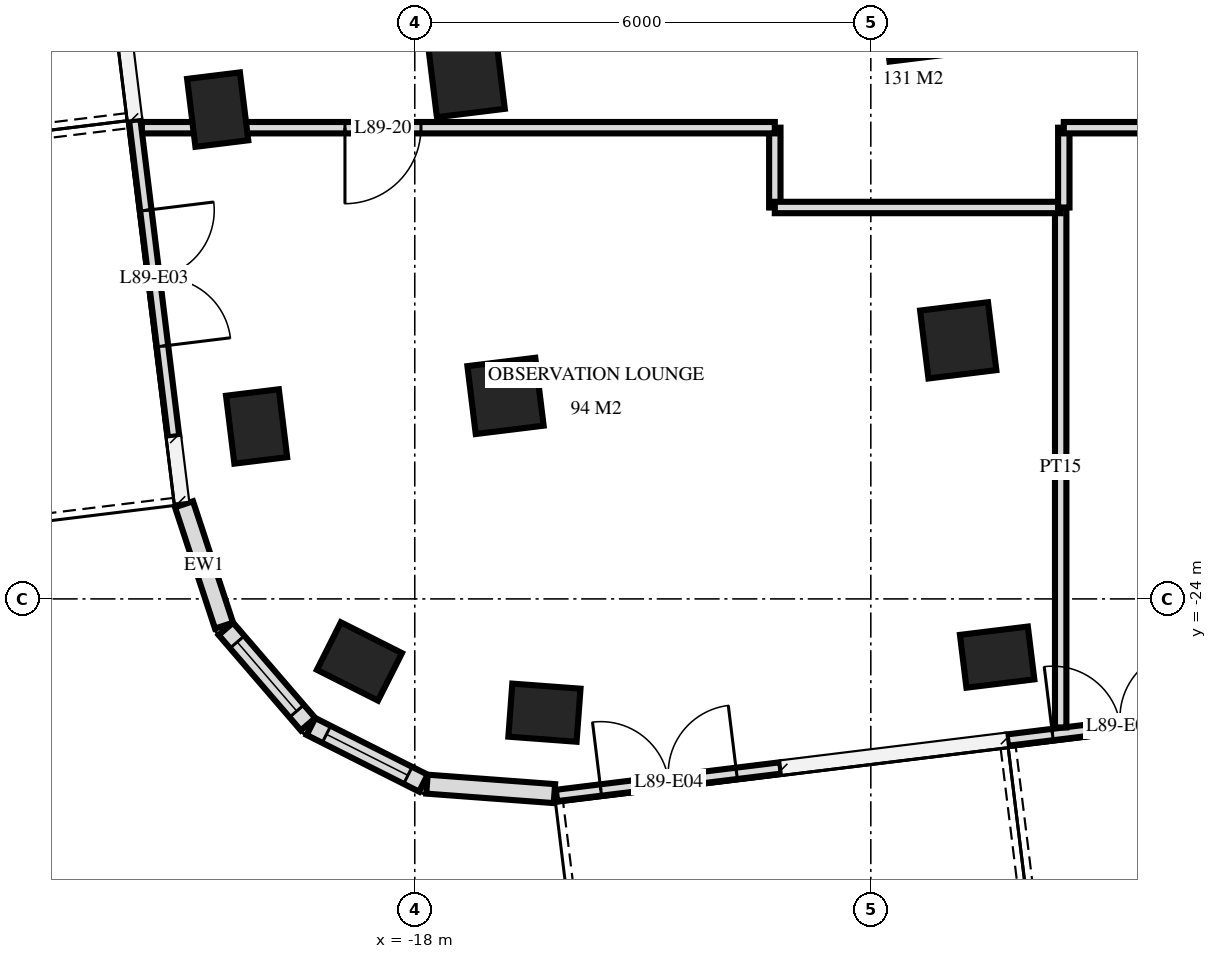
"""IFC4 building model, lengths in metres.
Left out: names, types, materials, properties, quantities, classifications, styles, units other than length and angle.
Written with IfcOpenShell. Run it as: python <this file> out.ifc"""

import sys

from ifc_helpers import new_model, si_unit, direction, frame, frame_2d, origin, origin_2d, place, context, subcontext, project, spatial, rectangle, extrude, element, fill, save


model = new_model("IFC4")
c1 = context("Model", 3, precision=1e-05, world=origin(), true_north=direction((0.0, 1.0)))
c2 = subcontext(c1, "Body", "Model", "MODEL_VIEW")
j1 = project(units=[si_unit("LENGTHUNIT", "METRE"), si_unit("PLANEANGLEUNIT", "RADIAN")], contexts=[c1])
p1 = place(None, origin())
s1 = spatial("IfcSite", under=j1, at=p1, CompositionType="ELEMENT")
p2 = place(p1, origin())
s2 = spatial("IfcBuilding", under=s1, at=p2, CompositionType="ELEMENT")
p3 = place(p2, frame((0.0, 0.0, 338.6)))
s3 = spatial("IfcBuildingStorey", under=s2, at=p3, CompositionType="ELEMENT", Elevation=338.6)
for number, where, z_axis, x_axis in (
    (1, (-20.593, -17.562, 0.0), (0.0, 0.0, 1.0), (-0.122, 0.993, 0.0)),
    (2, (-20.081, -21.731, 0.0), (0.0, 0.0, 1.0), (-0.122, 0.993, 0.0)),
    (3, (-18.728, -24.823, 0.0), (0.0, 0.0, 1.0), (-0.893, 0.45, 0.0)),
):
    element("IfcColumn", number, at=place(p3, frame(where, z_axis=z_axis, x_axis=x_axis)), inside=s3, PredefinedType="COLUMN", context=c2, shape_type="SweptSolid", body=[
        extrude(rectangle(XDim=0.9, YDim=0.7, at=origin_2d()), origin(), (0.0, 0.0, 1.0), 4.0),
    ])
for number, where, z_axis, x_axis in (
    (4, (-17.317, -17.16, 0.0), (0.0, 0.0, 1.0), (0.993, 0.122, 0.0)),
    (5, (-16.806, -21.329, 0.0), (0.0, 0.0, 1.0), (0.993, 0.122, 0.0)),
):
    element("IfcColumn", number, at=place(p3, frame(where, z_axis=z_axis, x_axis=x_axis)), inside=s3, PredefinedType="COLUMN", context=c2, shape_type="SweptSolid", body=[
        extrude(rectangle(XDim=0.9, YDim=0.9, at=origin_2d()), origin(), (0.0, 0.0, 1.0), 4.0),
    ])
p4 = place(p3, frame((-16.294, -25.497, 0.0), z_axis=(0.0, 0.0, 1.0), x_axis=(-0.997251478385, 0.074091084885, 0.0)))
e6 = element("IfcColumn", 6, at=p4, inside=s3, PredefinedType="COLUMN", context=c2, shape_type="SweptSolid", body=[
    extrude(rectangle(XDim=0.9, YDim=0.7, at=origin_2d()), origin(), (0.0, 0.0, 1.0), 4.0),
])
for number, where, z_axis, x_axis in (
    (7, (-11.362, -16.429, 0.0), (0.0, 0.0, 1.0), (0.993, 0.122, 0.0)),
    (8, (-10.85, -20.598, 0.0), (0.0, 0.0, 1.0), (0.993, 0.122, 0.0)),
):
    element("IfcColumn", number, at=place(p3, frame(where, z_axis=z_axis, x_axis=x_axis)), inside=s3, PredefinedType="COLUMN", context=c2, shape_type="SweptSolid", body=[
        extrude(rectangle(XDim=0.9, YDim=0.9, at=origin_2d()), origin(), (0.0, 0.0, 1.0), 4.0),
    ])
p5 = place(p3, frame((-10.338, -24.766, 0.0), z_axis=(0.0, 0.0, 1.0), x_axis=(0.992546151641, 0.121869343405, 0.0)))
e9 = element("IfcColumn", 9, at=p5, inside=s3, PredefinedType="COLUMN", context=c2, shape_type="SweptSolid", body=[
    extrude(rectangle(XDim=0.9, YDim=0.7, at=origin_2d()), origin(), (0.0, 0.0, 1.0), 4.0),
])
p6 = place(p3, frame((-21.685, -17.696, 0.0), z_axis=(0.0, 0.0, 1.0), x_axis=(0.121895320106, -0.992542961758, 0.0)))
e10 = element("IfcWall", 10, at=p6, inside=s3, PredefinedType="USERDEFINED", context=c2, shape_type="SweptSolid", body=[
    extrude(rectangle(XDim=4.2, YDim=0.15, at=frame_2d((2.1, 0.0))), origin(), (0.0, 0.0, 1.0), 3.72),
])
p7 = place(p6, frame((1.2, 0.0, 0.0)))
e11 = element("IfcOpeningElement", 11, at=p7, cuts=e10, PredefinedType="OPENING", context=c2, shape_type="SweptSolid", body=[
    extrude(rectangle(XDim=1.8, YDim=2.4, at=frame_2d((0.9, 1.2))), frame((0.0, 0.085, 0.0), z_axis=(0.0, -1.0, 0.0), x_axis=(1.0, 0.0, 0.0)), (0.0, 0.0, 1.0), 0.17),
])
p8 = place(p3, frame((-21.036, -22.755, 0.0), z_axis=(0.0, 0.0, 1.0), x_axis=(0.313046160822, -0.949737911844, 0.0)))
e12 = element("IfcWall", 12, at=p8, inside=s3, PredefinedType="SOLIDWALL", context=c2, shape_type="SweptSolid", body=[
    extrude(rectangle(XDim=1.681, YDim=0.25, at=frame_2d((0.841, 0.0))), origin(), (0.0, 0.0, 1.0), 3.72),
])
p9 = place(p3, frame((-20.485, -24.394, 0.0), z_axis=(0.0, 0.0, 1.0), x_axis=(0.652755886531, -0.757568315466, 0.0)))
e13 = element("IfcWall", 13, at=p9, inside=s3, PredefinedType="SOLIDWALL", context=c2, shape_type="SweptSolid", body=[
    extrude(rectangle(XDim=1.656, YDim=0.25, at=frame_2d((0.828, 0.0))), origin(), (0.0, 0.0, 1.0), 3.72),
])
p10 = place(p9, frame((0.228, 0.0, 0.9)))
e14 = element("IfcOpeningElement", 14, at=p10, cuts=e13, PredefinedType="OPENING", context=c2, shape_type="SweptSolid", body=[
    extrude(rectangle(XDim=1.2, YDim=1.5, at=frame_2d((0.6, 0.75))), frame((0.0, 0.135, 0.0), z_axis=(0.0, -1.0, 0.0), x_axis=(1.0, 0.0, 0.0)), (0.0, 0.0, 1.0), 0.27),
])
p11 = place(p3, frame((-19.366, -25.679, 0.0), z_axis=(0.0, 0.0, 1.0), x_axis=(0.893007580524, -0.450041621549, 0.0)))
e15 = element("IfcWall", 15, at=p11, inside=s3, PredefinedType="SOLIDWALL", context=c2, shape_type="SweptSolid", body=[
    extrude(rectangle(XDim=1.656, YDim=0.25, at=frame_2d((0.828, 0.0))), origin(), (0.0, 0.0, 1.0), 3.72),
])
p12 = place(p11, frame((0.228, 0.0, 0.9)))
e16 = element("IfcOpeningElement", 16, at=p12, cuts=e15, PredefinedType="OPENING", context=c2, shape_type="SweptSolid", body=[
    extrude(rectangle(XDim=1.2, YDim=1.5, at=frame_2d((0.6, 0.75))), frame((0.0, 0.135, 0.0), z_axis=(0.0, -1.0, 0.0), x_axis=(1.0, 0.0, 0.0)), (0.0, 0.0, 1.0), 0.27),
])
p13 = place(p3, frame((-17.84, -26.438, 0.0), z_axis=(0.0, 0.0, 1.0), x_axis=(0.997254267475, -0.074053534713, 0.0)))
e17 = element("IfcWall", 17, at=p13, inside=s3, PredefinedType="SOLIDWALL", context=c2, shape_type="SweptSolid", body=[
    extrude(rectangle(XDim=1.681, YDim=0.25, at=frame_2d((0.841, 0.0))), origin(), (0.0, 0.0, 1.0), 3.72),
])
p14 = place(p3, frame((-16.135, -26.586, 0.0), z_axis=(0.0, 0.0, 1.0), x_axis=(0.992549375183, 0.121843086893, 0.0)))
e18 = element("IfcWall", 18, at=p14, inside=s3, PredefinedType="USERDEFINED", context=c2, shape_type="SweptSolid", body=[
    extrude(rectangle(XDim=2.976, YDim=0.15, at=frame_2d((1.488, 0.0))), origin(), (0.0, 0.0, 1.0), 3.72),
])
p15 = place(p14, frame((0.588, 0.0, 0.0)))
e19 = element("IfcOpeningElement", 19, at=p15, cuts=e18, PredefinedType="OPENING", context=c2, shape_type="SweptSolid", body=[
    extrude(rectangle(XDim=1.8, YDim=2.4, at=frame_2d((0.9, 1.2))), frame((0.0, 0.085, 0.0), z_axis=(0.0, -1.0, 0.0), x_axis=(1.0, 0.0, 0.0)), (0.0, 0.0, 1.0), 0.17),
])
p16 = place(p3, frame((-10.204, -25.858, 0.0), z_axis=(0.0, 0.0, 1.0), x_axis=(0.99255088108, 0.121830819037, 0.0)))
e20 = element("IfcWall", 20, at=p16, inside=s3, PredefinedType="USERDEFINED", context=c2, shape_type="SweptSolid", body=[
    extrude(rectangle(XDim=3.0, YDim=0.15, at=frame_2d((1.5, 0.0))), origin(), (0.0, 0.0, 1.0), 3.72),
])
p17 = place(p16, frame((0.6, 0.0, 0.0)))
e21 = element("IfcOpeningElement", 21, at=p17, cuts=e20, PredefinedType="OPENING", context=c2, shape_type="SweptSolid", body=[
    extrude(rectangle(XDim=1.8, YDim=2.4, at=frame_2d((0.9, 1.2))), frame((0.0, 0.085, 0.0), z_axis=(0.0, -1.0, 0.0), x_axis=(1.0, 0.0, 0.0)), (0.0, 0.0, 1.0), 0.17),
])
p18 = place(p3, frame((-5.148, -27.655, 0.0), z_axis=(0.0, 0.0, 1.0), x_axis=(-0.992545758265, -0.121872547154, 0.0)))
e22 = element("IfcWall", 22, at=p18, inside=s3, PredefinedType="USERDEFINED", context=c2, shape_type="SweptSolid", body=[
    extrude(rectangle(XDim=3.6, YDim=0.6, at=frame_2d((1.8, 0.0))), origin(), (0.0, 0.0, 1.0), 0.65),
])
p19 = place(p3, frame((-9.461, -18.85, 0.0), z_axis=(0.0, 0.0, 1.0), x_axis=(0.0, 1.0, 0.0)))
e23 = element("IfcWall", 23, at=p19, inside=s3, PredefinedType="PARTITIONING", context=c2, shape_type="SweptSolid", body=[
    extrude(rectangle(XDim=1.05, YDim=0.15, at=frame_2d((0.525, 0.0))), origin(), (0.0, 0.0, 1.0), 3.72),
])
p20 = place(p3, frame((-9.502, -25.691, 0.0), z_axis=(0.0, 0.0, 1.0), x_axis=(0.0, 1.0, 0.0)))
e24 = element("IfcWall", 24, at=p20, inside=s3, PredefinedType="PARTITIONING", context=c2, shape_type="SweptSolid", body=[
    extrude(rectangle(XDim=6.841, YDim=0.15, at=frame_2d((3.42, 0.0))), origin(), (0.0, 0.0, 1.0), 3.72),
])
p21 = place(p3, frame((-13.263, -18.85, 0.0), z_axis=(0.0, 0.0, 1.0), x_axis=(0.0, 1.0, 0.0)))
e25 = element("IfcWall", 25, at=p21, inside=s3, PredefinedType="PARTITIONING", context=c2, shape_type="SweptSolid", body=[
    extrude(rectangle(XDim=1.05, YDim=0.15, at=frame_2d((0.525, 0.0))), origin(), (0.0, 0.0, 1.0), 3.72),
])
p22 = place(p3, frame((-13.263, -18.85, 0.0), z_axis=(0.0, 0.0, 1.0), x_axis=(1.0, 0.0, 0.0)))
e26 = element("IfcWall", 26, at=p22, inside=s3, PredefinedType="PARTITIONING", context=c2, shape_type="SweptSolid", body=[
    extrude(rectangle(XDim=3.761, YDim=0.15, at=frame_2d((1.88, 0.0))), origin(), (0.0, 0.0, 1.0), 3.72),
])
p23 = place(p3, frame((-21.591, -17.8, 0.0), z_axis=(0.0, 0.0, 1.0), x_axis=(1.0, 0.0, 0.0)))
e27 = element("IfcWall", 27, at=p23, inside=s3, PredefinedType="PARTITIONING", context=c2, shape_type="SweptSolid", body=[
    extrude(rectangle(XDim=8.328, YDim=0.15, at=frame_2d((4.164, 0.0))), origin(), (0.0, 0.0, 1.0), 3.72),
])
p24 = place(p23, frame((2.673, 0.0, 0.0)))
e28 = element("IfcOpeningElement", 28, at=p24, cuts=e27, PredefinedType="OPENING", context=c2, shape_type="SweptSolid", body=[
    extrude(rectangle(XDim=1.0, YDim=2.1, at=frame_2d((0.5, 1.05))), frame((0.0, 0.085, 0.0), z_axis=(0.0, -1.0, 0.0), x_axis=(1.0, 0.0, 0.0)), (0.0, 0.0, 1.0), 0.17),
])
p25 = place(p3, frame((-9.461, -17.8, 0.0), z_axis=(0.0, 0.0, 1.0), x_axis=(1.0, 0.0, 0.0)))
e29 = element("IfcWall", 29, at=p25, inside=s3, PredefinedType="PARTITIONING", context=c2, shape_type="SweptSolid", body=[
    extrude(rectangle(XDim=32.744, YDim=0.15, at=frame_2d((16.372, 0.0))), origin(), (0.0, 0.0, 1.0), 3.72),
])
p26 = place(p25, frame((4.489, 0.0, 0.0)))
e30 = element("IfcOpeningElement", 30, at=p26, cuts=e29, PredefinedType="OPENING", context=c2, shape_type="SweptSolid", body=[
    extrude(rectangle(XDim=1.0, YDim=2.1, at=frame_2d((0.5, 1.05))), frame((0.0, 0.085, 0.0), z_axis=(0.0, -1.0, 0.0), x_axis=(1.0, 0.0, 0.0)), (0.0, 0.0, 1.0), 0.17),
])
p27 = place(p25, frame((13.439, 0.0, 0.0)))
e31 = element("IfcOpeningElement", 31, at=p27, cuts=e29, PredefinedType="OPENING", context=c2, shape_type="SweptSolid", body=[
    extrude(rectangle(XDim=1.0, YDim=2.1, at=frame_2d((0.5, 1.05))), frame((0.0, 0.085, 0.0), z_axis=(0.0, -1.0, 0.0), x_axis=(1.0, 0.0, 0.0)), (0.0, 0.0, 1.0), 0.17),
])
p28 = place(p25, frame((20.831, 0.0, 0.0)))
e32 = element("IfcOpeningElement", 32, at=p28, cuts=e29, PredefinedType="OPENING", context=c2, shape_type="SweptSolid", body=[
    extrude(rectangle(XDim=1.0, YDim=2.1, at=frame_2d((0.5, 1.05))), frame((0.0, 0.085, 0.0), z_axis=(0.0, -1.0, 0.0), x_axis=(1.0, 0.0, 0.0)), (0.0, 0.0, 1.0), 0.17),
])
p29 = place(p25, frame((28.989, 0.0, 0.0)))
e33 = element("IfcOpeningElement", 33, at=p29, cuts=e29, PredefinedType="OPENING", context=c2, shape_type="SweptSolid", body=[
    extrude(rectangle(XDim=1.0, YDim=2.1, at=frame_2d((0.5, 1.05))), frame((0.0, 0.085, 0.0), z_axis=(0.0, -1.0, 0.0), x_axis=(1.0, 0.0, 0.0)), (0.0, 0.0, 1.0), 0.17),
])
p30 = place(p7, origin())
e34 = element("IfcDoor", 34, at=p30, inside=s3, OperationType="DOUBLE_DOOR_SINGLE_SWING", PredefinedType="DOOR", context=c2, shape_type="SweptSolid", body=[
    extrude(rectangle(XDim=1.8, YDim=2.4, at=frame_2d((0.9, 1.2))), frame((0.0, 0.025, 0.0), z_axis=(0.0, -1.0, 0.0), x_axis=(1.0, 0.0, 0.0)), (0.0, 0.0, 1.0), 0.05),
])
fill(e11, e34)
p31 = place(p10, origin())
e35 = element("IfcWindow", 35, at=p31, inside=s3, PartitioningType="SINGLE_PANEL", PredefinedType="WINDOW", context=c2, shape_type="SweptSolid", body=[
    extrude(rectangle(XDim=1.2, YDim=1.5, at=frame_2d((0.6, 0.75))), frame((0.0, 0.03, 0.0), z_axis=(0.0, -1.0, 0.0), x_axis=(1.0, 0.0, 0.0)), (0.0, 0.0, 1.0), 0.06),
])
fill(e14, e35)
p32 = place(p12, origin())
e36 = element("IfcWindow", 36, at=p32, inside=s3, PartitioningType="SINGLE_PANEL", PredefinedType="WINDOW", context=c2, shape_type="SweptSolid", body=[
    extrude(rectangle(XDim=1.2, YDim=1.5, at=frame_2d((0.6, 0.75))), frame((0.0, 0.03, 0.0), z_axis=(0.0, -1.0, 0.0), x_axis=(1.0, 0.0, 0.0)), (0.0, 0.0, 1.0), 0.06),
])
fill(e16, e36)
p33 = place(p15, origin())
e37 = element("IfcDoor", 37, at=p33, inside=s3, OperationType="DOUBLE_DOOR_SINGLE_SWING", PredefinedType="DOOR", context=c2, shape_type="SweptSolid", body=[
    extrude(rectangle(XDim=1.8, YDim=2.4, at=frame_2d((0.9, 1.2))), frame((0.0, 0.025, 0.0), z_axis=(0.0, -1.0, 0.0), x_axis=(1.0, 0.0, 0.0)), (0.0, 0.0, 1.0), 0.05),
])
fill(e19, e37)
p34 = place(p17, origin())
e38 = element("IfcDoor", 38, at=p34, inside=s3, OperationType="DOUBLE_DOOR_SINGLE_SWING", PredefinedType="DOOR", context=c2, shape_type="SweptSolid", body=[
    extrude(rectangle(XDim=1.8, YDim=2.4, at=frame_2d((0.9, 1.2))), frame((0.0, 0.025, 0.0), z_axis=(0.0, -1.0, 0.0), x_axis=(1.0, 0.0, 0.0)), (0.0, 0.0, 1.0), 0.05),
])
fill(e21, e38)
p35 = place(p24, frame((0.5, 0.0, 0.0), z_axis=(0.0, 0.0, 1.0), x_axis=(-1.0, 0.0, 0.0)))
e39 = element("IfcDoor", 39, at=p35, inside=s3, OperationType="SINGLE_SWING_LEFT", PredefinedType="DOOR", context=c2, shape_type="SweptSolid", body=[
    extrude(rectangle(XDim=1.0, YDim=2.1, at=frame_2d((0.0, 1.05))), frame((0.0, -0.025, 0.0), z_axis=(0.0, 1.0, 0.0), x_axis=(-1.0, 0.0, 0.0)), (0.0, 0.0, 1.0), 0.05),
])
fill(e28, e39)
save(model, sys.argv[1])
